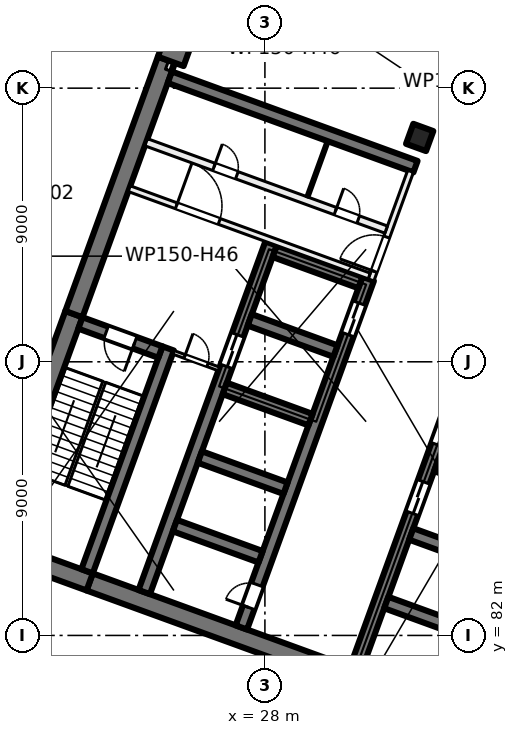
"""IFC4 building model, lengths in metres.
Left out: names, types, materials, properties, quantities, classifications, styles, units other than length and angle.
Written with IfcOpenShell. Run it as: python <this file> out.ifc"""

import sys

from ifc_helpers import new_model, si_unit, direction, frame, frame_2d, origin, origin_2d, place, context, subcontext, project, spatial, rectangle, extrude, element, fill, save


model = new_model("IFC4")
c1 = context("Model", 3, precision=1e-05, world=origin(), true_north=direction((0.0, 1.0)))
c2 = subcontext(c1, "Body", "Model", "MODEL_VIEW")
j1 = project(units=[si_unit("LENGTHUNIT", "METRE"), si_unit("PLANEANGLEUNIT", "RADIAN")], contexts=[c1])
p1 = place(None, origin())
s1 = spatial("IfcSite", under=j1, at=p1, CompositionType="ELEMENT")
p2 = place(p1, origin())
s2 = spatial("IfcBuilding", under=s1, at=p2, CompositionType="ELEMENT")
p3 = place(p2, frame((0.0, 0.0, 17.5)))
s3 = spatial("IfcBuildingStorey", under=s2, at=p3, CompositionType="ELEMENT", Elevation=17.5)
p4 = place(p3, frame((33.091, 98.379, 0.0), z_axis=(0.0, 0.0, 1.0), x_axis=(-0.342020143326, -0.939692620786, 0.0)))
e1 = element("IfcColumn", 1, at=p4, inside=s3, PredefinedType="COLUMN", context=c2, shape_type="SweptSolid", body=[
    extrude(rectangle(XDim=0.7, YDim=0.7, at=origin_2d()), origin(), (0.0, 0.0, 1.0), 5.0),
])
p5 = place(p3, frame((25.056, 101.303, 0.0), z_axis=(0.0, 0.0, 1.0), x_axis=(-0.342020143326, -0.939692620786, 0.0)))
e2 = element("IfcColumn", 2, at=p5, inside=s3, PredefinedType="COLUMN", context=c2, shape_type="SweptSolid", body=[
    extrude(rectangle(XDim=0.9, YDim=0.9, at=origin_2d()), origin(), (0.0, 0.0, 1.0), 5.0),
])
p6 = place(p3, frame((35.767, 78.835, 0.0), z_axis=(0.0, 0.0, 1.0), x_axis=(-0.939692894512, 0.342019391267, 0.0)))
e3 = element("IfcWall", 3, at=p6, inside=s3, PredefinedType="SHEAR", context=c2, shape_type="SweptSolid", body=[
    extrude(rectangle(XDim=14.4, YDim=0.6, at=frame_2d((7.2, 0.0))), origin(), (0.0, 0.0, 1.0), 5.0),
])
p7 = place(p3, frame((22.236, 83.76, 0.0), z_axis=(0.0, 0.0, 1.0), x_axis=(-0.939680822529, 0.342052557032, 0.0)))
e4 = element("IfcWall", 4, at=p7, inside=s3, PredefinedType="SHEAR", context=c2, shape_type="SweptSolid", body=[
    extrude(rectangle(XDim=3.8, YDim=0.6, at=frame_2d((1.9, 0.0))), origin(), (0.0, 0.0, 1.0), 5.0),
])
p8 = place(p3, frame((19.05, 85.239, 0.0), z_axis=(0.0, 0.0, 1.0), x_axis=(0.342016982193, 0.939693771338, 0.0)))
e5 = element("IfcWall", 5, at=p8, inside=s3, PredefinedType="SHEAR", context=c2, shape_type="SweptSolid", body=[
    extrude(rectangle(XDim=7.8, YDim=0.6, at=frame_2d((3.9, 0.0))), origin(), (0.0, 0.0, 1.0), 5.0),
])
p9 = place(p3, frame((21.717, 92.568, 0.0), z_axis=(0.0, 0.0, 1.0), x_axis=(0.342016162452, 0.939694069696, 0.0)))
e6 = element("IfcWall", 6, at=p9, inside=s3, PredefinedType="SHEAR", context=c2, shape_type="SweptSolid", body=[
    extrude(rectangle(XDim=8.9, YDim=0.6, at=frame_2d((4.45, 0.0))), origin(), (0.0, 0.0, 1.0), 5.0),
])
p10 = place(p3, frame((22.15, 84.11, 0.0), z_axis=(0.0, 0.0, 1.0), x_axis=(0.342016982193, 0.939693771338, 0.0)))
e7 = element("IfcWall", 7, at=p10, inside=s3, PredefinedType="SHEAR", context=c2, shape_type="SweptSolid", body=[
    extrude(rectangle(XDim=7.8, YDim=0.4, at=frame_2d((3.9, 0.0))), origin(), (0.0, 0.0, 1.0), 5.0),
])
p11 = place(p3, frame((24.562, 91.32, 0.0), z_axis=(0.0, 0.0, 1.0), x_axis=(-0.939717030584, 0.341953070509, 0.0)))
e8 = element("IfcWall", 8, at=p11, inside=s3, PredefinedType="SHEAR", context=c2, shape_type="SweptSolid", body=[
    extrude(rectangle(XDim=2.8, YDim=0.4, at=frame_2d((1.4, 0.0))), origin(), (0.0, 0.0, 1.0), 5.0),
])
p12 = place(p11, frame((0.9, 0.0, 0.0)))
e9 = element("IfcOpeningElement", 9, at=p12, cuts=e8, PredefinedType="OPENING", context=c2, shape_type="SweptSolid", body=[
    extrude(rectangle(XDim=1.0, YDim=2.1, at=frame_2d((0.5, 1.05))), frame((0.0, 0.21, 0.0), z_axis=(0.0, -1.0, 0.0), x_axis=(1.0, 0.0, 0.0)), (0.0, 0.0, 1.0), 0.42),
])
p13 = place(p3, frame((30.984, 80.895, 0.0), z_axis=(0.0, 0.0, 1.0), x_axis=(0.342021021735, 0.939692301071, 0.0)))
e10 = element("IfcWall", 10, at=p13, inside=s3, PredefinedType="SHEAR", context=c2, shape_type="SweptSolid", body=[
    extrude(rectangle(XDim=12.2, YDim=0.4, at=frame_2d((6.1, 0.0))), origin(), (0.0, 0.0, 1.0), 5.0),
])
p14 = place(p13, frame((5.45, 0.0, 0.0)))
e11 = element("IfcOpeningElement", 11, at=p14, cuts=e10, PredefinedType="OPENING", context=c2, shape_type="SweptSolid", body=[
    extrude(rectangle(XDim=1.1, YDim=2.1, at=frame_2d((0.55, 1.05))), frame((0.0, 0.21, 0.0), z_axis=(0.0, -1.0, 0.0), x_axis=(1.0, 0.0, 0.0)), (0.0, 0.0, 1.0), 0.42),
])
p15 = place(p13, frame((7.85, 0.0, 0.0)))
e12 = element("IfcOpeningElement", 12, at=p15, cuts=e10, PredefinedType="OPENING", context=c2, shape_type="SweptSolid", body=[
    extrude(rectangle(XDim=1.1, YDim=2.1, at=frame_2d((0.55, 1.05))), frame((0.0, 0.21, 0.0), z_axis=(0.0, -1.0, 0.0), x_axis=(1.0, 0.0, 0.0)), (0.0, 0.0, 1.0), 0.42),
])
p16 = place(p13, frame((10.25, 0.0, 0.0)))
e13 = element("IfcOpeningElement", 13, at=p16, cuts=e10, PredefinedType="OPENING", context=c2, shape_type="SweptSolid", body=[
    extrude(rectangle(XDim=1.1, YDim=2.1, at=frame_2d((0.55, 1.05))), frame((0.0, 0.21, 0.0), z_axis=(0.0, -1.0, 0.0), x_axis=(1.0, 0.0, 0.0)), (0.0, 0.0, 1.0), 0.42),
])
for number, where, z_axis, x_axis in (
    (14, (34.812, 82.056, 0.0), (0.0, 0.0, 1.0), (-0.94, 0.342, 0.0)),
    (15, (35.632, 84.311, 0.0), (0.0, 0.0, 1.0), (-0.94, 0.342, 0.0)),
    (16, (36.453, 86.566, 0.0), (0.0, 0.0, 1.0), (-0.94, 0.342, 0.0)),
):
    element("IfcWall", number, at=place(p3, frame(where, z_axis=z_axis, x_axis=x_axis)), inside=s3, PredefinedType="SHEAR", context=c2, shape_type="SweptSolid", body=[
        extrude(rectangle(XDim=3.0, YDim=0.4, at=frame_2d((1.5, 0.0))), origin(), (0.0, 0.0, 1.0), 5.0),
    ])
p17 = place(p3, frame((27.225, 82.263, 0.0), z_axis=(0.0, 0.0, 1.0), x_axis=(0.342014590177, 0.939694641948, 0.0)))
e17 = element("IfcWall", 17, at=p17, inside=s3, PredefinedType="SHEAR", context=c2, shape_type="SweptSolid", body=[
    extrude(rectangle(XDim=12.2, YDim=0.4, at=frame_2d((6.1, 0.0))), origin(), (0.0, 0.0, 1.0), 5.0),
])
p18 = place(p17, frame((10.25, 0.0, 0.0)))
e18 = element("IfcOpeningElement", 18, at=p18, cuts=e17, PredefinedType="OPENING", context=c2, shape_type="SweptSolid", body=[
    extrude(rectangle(XDim=1.1, YDim=2.1, at=frame_2d((0.55, 1.05))), frame((0.0, 0.21, 0.0), z_axis=(0.0, -1.0, 0.0), x_axis=(1.0, 0.0, 0.0)), (0.0, 0.0, 1.0), 0.42),
])
p19 = place(p17, frame((0.7, 0.0, 0.0)))
e19 = element("IfcOpeningElement", 19, at=p19, cuts=e17, PredefinedType="OPENING", context=c2, shape_type="SweptSolid", body=[
    extrude(rectangle(XDim=0.8, YDim=2.1, at=frame_2d((0.4, 1.05))), frame((0.0, 0.21, 0.0), z_axis=(0.0, -1.0, 0.0), x_axis=(1.0, 0.0, 0.0)), (0.0, 0.0, 1.0), 0.42),
])
p20 = place(p3, frame((24.03, 83.426, 0.0), z_axis=(0.0, 0.0, 1.0), x_axis=(0.342014590177, 0.939694641948, 0.0)))
e20 = element("IfcWall", 20, at=p20, inside=s3, PredefinedType="SHEAR", context=c2, shape_type="SweptSolid", body=[
    extrude(rectangle(XDim=12.2, YDim=0.4, at=frame_2d((6.1, 0.0))), origin(), (0.0, 0.0, 1.0), 5.0),
])
p21 = place(p20, frame((7.9, 0.0, 0.0)))
e21 = element("IfcOpeningElement", 21, at=p21, cuts=e20, PredefinedType="OPENING", context=c2, shape_type="SweptSolid", body=[
    extrude(rectangle(XDim=1.1, YDim=2.1, at=frame_2d((0.55, 1.05))), frame((0.0, 0.21, 0.0), z_axis=(0.0, -1.0, 0.0), x_axis=(1.0, 0.0, 0.0)), (0.0, 0.0, 1.0), 0.42),
])
p22 = place(p3, frame((27.858, 84.587, 0.0), z_axis=(0.0, 0.0, 1.0), x_axis=(-0.939686455819, 0.342037080957, 0.0)))
e22 = element("IfcWall", 22, at=p22, inside=s3, PredefinedType="SHEAR", context=c2, shape_type="SweptSolid", body=[
    extrude(rectangle(XDim=3.0, YDim=0.4, at=frame_2d((1.5, 0.0))), origin(), (0.0, 0.0, 1.0), 5.0),
])
p23 = place(p3, frame((28.678, 86.842, 0.0), z_axis=(0.0, 0.0, 1.0), x_axis=(-0.939676934218, 0.342063238742, 0.0)))
e23 = element("IfcWall", 23, at=p23, inside=s3, PredefinedType="SHEAR", context=c2, shape_type="SweptSolid", body=[
    extrude(rectangle(XDim=3.0, YDim=0.4, at=frame_2d((1.5, 0.0))), origin(), (0.0, 0.0, 1.0), 5.0),
])
for number, where, z_axis, x_axis in (
    (24, (29.5, 89.097, 0.0), (0.0, 0.0, 1.0), (-0.94, 0.342, 0.0)),
    (25, (30.32, 91.353, 0.0), (0.0, 0.0, 1.0), (-0.94, 0.342, 0.0)),
    (26, (31.141, 93.608, 0.0), (0.0, 0.0, 1.0), (-0.94, 0.342, 0.0)),
):
    element("IfcWall", number, at=place(p3, frame(where, z_axis=z_axis, x_axis=x_axis)), inside=s3, PredefinedType="SHEAR", context=c2, shape_type="SweptSolid", body=[
        extrude(rectangle(XDim=3.0, YDim=0.4, at=frame_2d((1.5, 0.0))), origin(), (0.0, 0.0, 1.0), 5.0),
    ])
p24 = place(p3, frame((32.953, 97.418, 0.0), z_axis=(0.0, 0.0, 1.0), x_axis=(-0.93969060187, 0.342025690201, 0.0)))
e27 = element("IfcWall", 27, at=p24, inside=s3, PredefinedType="SHEAR", context=c2, shape_type="SweptSolid", body=[
    extrude(rectangle(XDim=8.6, YDim=0.4, at=frame_2d((4.3, 0.0))), origin(), (0.0, 0.0, 1.0), 5.0),
])
p25 = place(p3, frame((12.199, 89.809, 0.0), z_axis=(0.0, 0.0, 1.0), x_axis=(0.342022998908, 0.939691581434, 0.0)))
e28 = element("IfcWall", 28, at=p25, inside=s3, PredefinedType="SOLIDWALL", context=c2, shape_type="SweptSolid", body=[
    extrude(rectangle(XDim=47.334, YDim=0.6, at=frame_2d((23.667, 0.0))), origin(), (0.0, 0.0, 1.0), 4.6),
])
p26 = place(p25, frame((0.773, 0.0, 0.9)))
e29 = element("IfcOpeningElement", 29, at=p26, cuts=e28, PredefinedType="OPENING", context=c2, shape_type="SweptSolid", body=[
    extrude(rectangle(XDim=3.0, YDim=3.0, at=frame_2d((1.5, 1.5))), frame((0.0, 0.31, 0.0), z_axis=(0.0, -1.0, 0.0), x_axis=(1.0, 0.0, 0.0)), (0.0, 0.0, 1.0), 0.62),
])
p27 = place(p25, frame((5.379, 0.0, 0.9)))
e30 = element("IfcOpeningElement", 30, at=p27, cuts=e28, PredefinedType="OPENING", context=c2, shape_type="SweptSolid", body=[
    extrude(rectangle(XDim=3.0, YDim=3.0, at=frame_2d((1.5, 1.5))), frame((0.0, 0.31, 0.0), z_axis=(0.0, -1.0, 0.0), x_axis=(1.0, 0.0, 0.0)), (0.0, 0.0, 1.0), 0.62),
])
p28 = place(p25, frame((9.235, 0.0, 0.9)))
e31 = element("IfcOpeningElement", 31, at=p28, cuts=e28, PredefinedType="OPENING", context=c2, shape_type="SweptSolid", body=[
    extrude(rectangle(XDim=3.0, YDim=3.0, at=frame_2d((1.5, 1.5))), frame((0.0, 0.31, 0.0), z_axis=(0.0, -1.0, 0.0), x_axis=(1.0, 0.0, 0.0)), (0.0, 0.0, 1.0), 0.62),
])
p29 = place(p25, frame((13.99, 0.0, 0.9)))
e32 = element("IfcOpeningElement", 32, at=p29, cuts=e28, PredefinedType="OPENING", context=c2, shape_type="SweptSolid", body=[
    extrude(rectangle(XDim=3.0, YDim=3.0, at=frame_2d((1.5, 1.5))), frame((0.0, 0.31, 0.0), z_axis=(0.0, -1.0, 0.0), x_axis=(1.0, 0.0, 0.0)), (0.0, 0.0, 1.0), 0.62),
])
p30 = place(p25, frame((18.118, 0.0, 0.9)))
e33 = element("IfcOpeningElement", 33, at=p30, cuts=e28, PredefinedType="OPENING", context=c2, shape_type="SweptSolid", body=[
    extrude(rectangle(XDim=1.2, YDim=3.0, at=frame_2d((0.6, 1.5))), frame((0.0, 0.31, 0.0), z_axis=(0.0, -1.0, 0.0), x_axis=(1.0, 0.0, 0.0)), (0.0, 0.0, 1.0), 0.62),
])
p31 = place(p25, frame((19.618, 0.0, 0.9)))
e34 = element("IfcOpeningElement", 34, at=p31, cuts=e28, PredefinedType="OPENING", context=c2, shape_type="SweptSolid", body=[
    extrude(rectangle(XDim=1.2, YDim=3.0, at=frame_2d((0.6, 1.5))), frame((0.0, 0.31, 0.0), z_axis=(0.0, -1.0, 0.0), x_axis=(1.0, 0.0, 0.0)), (0.0, 0.0, 1.0), 0.62),
])
p32 = place(p25, frame((22.452, 0.0, 0.9)))
e35 = element("IfcOpeningElement", 35, at=p32, cuts=e28, PredefinedType="OPENING", context=c2, shape_type="SweptSolid", body=[
    extrude(rectangle(XDim=3.0, YDim=3.0, at=frame_2d((1.5, 1.5))), frame((0.0, 0.31, 0.0), z_axis=(0.0, -1.0, 0.0), x_axis=(1.0, 0.0, 0.0)), (0.0, 0.0, 1.0), 0.62),
])
p33 = place(p25, frame((26.458, 0.0, 0.9)))
e36 = element("IfcOpeningElement", 36, at=p33, cuts=e28, PredefinedType="OPENING", context=c2, shape_type="SweptSolid", body=[
    extrude(rectangle(XDim=3.0, YDim=3.0, at=frame_2d((1.5, 1.5))), frame((0.0, 0.31, 0.0), z_axis=(0.0, -1.0, 0.0), x_axis=(1.0, 0.0, 0.0)), (0.0, 0.0, 1.0), 0.62),
])
p34 = place(p25, frame((32.484, 0.0, 0.9)))
e37 = element("IfcOpeningElement", 37, at=p34, cuts=e28, PredefinedType="OPENING", context=c2, shape_type="SweptSolid", body=[
    extrude(rectangle(XDim=1.2, YDim=3.0, at=frame_2d((0.6, 1.5))), frame((0.0, 0.31, 0.0), z_axis=(0.0, -1.0, 0.0), x_axis=(1.0, 0.0, 0.0)), (0.0, 0.0, 1.0), 0.62),
])
p35 = place(p25, frame((35.07, 0.0, 0.9)))
e38 = element("IfcOpeningElement", 38, at=p35, cuts=e28, PredefinedType="OPENING", context=c2, shape_type="SweptSolid", body=[
    extrude(rectangle(XDim=3.0, YDim=3.0, at=frame_2d((1.5, 1.5))), frame((0.0, 0.31, 0.0), z_axis=(0.0, -1.0, 0.0), x_axis=(1.0, 0.0, 0.0)), (0.0, 0.0, 1.0), 0.62),
])
p36 = place(p25, frame((39.676, 0.0, 0.9)))
e39 = element("IfcOpeningElement", 39, at=p36, cuts=e28, PredefinedType="OPENING", context=c2, shape_type="SweptSolid", body=[
    extrude(rectangle(XDim=3.0, YDim=3.0, at=frame_2d((1.5, 1.5))), frame((0.0, 0.31, 0.0), z_axis=(0.0, -1.0, 0.0), x_axis=(1.0, 0.0, 0.0)), (0.0, 0.0, 1.0), 0.62),
])
p37 = place(p25, frame((43.531, 0.0, 0.9)))
e40 = element("IfcOpeningElement", 40, at=p37, cuts=e28, PredefinedType="OPENING", context=c2, shape_type="SweptSolid", body=[
    extrude(rectangle(XDim=3.0, YDim=3.0, at=frame_2d((1.5, 1.5))), frame((0.0, 0.31, 0.0), z_axis=(0.0, -1.0, 0.0), x_axis=(1.0, 0.0, 0.0)), (0.0, 0.0, 1.0), 0.62),
])
p38 = place(p3, frame((31.491, 93.693, 0.0), z_axis=(0.0, 0.0, 1.0), x_axis=(0.341995824804, 0.939701471648, 0.0)))
e41 = element("IfcWall", 41, at=p38, inside=s3, PredefinedType="PARTITIONING", context=c2, shape_type="SweptSolid", body=[
    extrude(rectangle(XDim=3.8, YDim=0.2, at=frame_2d((1.9, 0.0))), origin(), (0.0, 0.0, 1.0), 4.6),
])
p39 = place(p38, frame((0.3, 0.0, 0.0)))
e42 = element("IfcOpeningElement", 42, at=p39, cuts=e41, PredefinedType="OPENING", context=c2, shape_type="SweptSolid", body=[
    extrude(rectangle(XDim=1.2, YDim=2.1, at=frame_2d((0.6, 1.05))), frame((0.0, 0.11, 0.0), z_axis=(0.0, -1.0, 0.0), x_axis=(1.0, 0.0, 0.0)), (0.0, 0.0, 1.0), 0.22),
])
p40 = place(p3, frame((23.538, 96.694, 0.0), z_axis=(0.0, 0.0, 1.0), x_axis=(0.939691552312, -0.342023078919, 0.0)))
e43 = element("IfcWall", 43, at=p40, inside=s3, PredefinedType="PARTITIONING", context=c2, shape_type="SweptSolid", body=[
    extrude(rectangle(XDim=8.4, YDim=0.2, at=frame_2d((4.2, 0.0))), origin(), (0.0, 0.0, 1.0), 4.6),
])
p41 = place(p40, frame((1.65, 0.0, 0.0)))
e44 = element("IfcOpeningElement", 44, at=p41, cuts=e43, PredefinedType="OPENING", context=c2, shape_type="SweptSolid", body=[
    extrude(rectangle(XDim=1.5, YDim=2.1, at=frame_2d((0.75, 1.05))), frame((0.0, 0.11, 0.0), z_axis=(0.0, -1.0, 0.0), x_axis=(1.0, 0.0, 0.0)), (0.0, 0.0, 1.0), 0.22),
])
p42 = place(p3, frame((24.094, 98.221, 0.0), z_axis=(0.0, 0.0, 1.0), x_axis=(0.939691552312, -0.342023078919, 0.0)))
e45 = element("IfcWall", 45, at=p42, inside=s3, PredefinedType="PARTITIONING", context=c2, shape_type="SweptSolid", body=[
    extrude(rectangle(XDim=8.4, YDim=0.25, at=frame_2d((4.2, 0.0))), origin(), (0.0, 0.0, 1.0), 4.6),
])
p43 = place(p42, frame((6.625, 0.0, 0.0)))
e46 = element("IfcOpeningElement", 46, at=p43, cuts=e45, PredefinedType="OPENING", context=c2, shape_type="SweptSolid", body=[
    extrude(rectangle(XDim=0.8, YDim=2.1, at=frame_2d((0.4, 1.05))), frame((0.0, 0.135, 0.0), z_axis=(0.0, -1.0, 0.0), x_axis=(1.0, 0.0, 0.0)), (0.0, 0.0, 1.0), 0.27),
])
p44 = place(p42, frame((2.375, 0.0, 0.0)))
e47 = element("IfcOpeningElement", 47, at=p44, cuts=e45, PredefinedType="OPENING", context=c2, shape_type="SweptSolid", body=[
    extrude(rectangle(XDim=0.8, YDim=2.1, at=frame_2d((0.4, 1.05))), frame((0.0, 0.135, 0.0), z_axis=(0.0, -1.0, 0.0), x_axis=(1.0, 0.0, 0.0)), (0.0, 0.0, 1.0), 0.27),
])
p45 = place(p3, frame((24.985, 91.312, 0.0), z_axis=(0.0, 0.0, 1.0), x_axis=(0.939708740826, -0.341975850632, 0.0)))
e48 = element("IfcWall", 48, at=p45, inside=s3, PredefinedType="PARTITIONING", context=c2, shape_type="SweptSolid", body=[
    extrude(rectangle(XDim=1.6, YDim=0.125, at=frame_2d((0.8, 0.0))), origin(), (0.0, 0.0, 1.0), 4.6),
])
p46 = place(p45, frame((0.4, 0.0, 0.0)))
e49 = element("IfcOpeningElement", 49, at=p46, cuts=e48, PredefinedType="OPENING", context=c2, shape_type="SweptSolid", body=[
    extrude(rectangle(XDim=0.8, YDim=2.1, at=frame_2d((0.4, 1.05))), frame((0.0, 0.073, 0.0), z_axis=(0.0, -1.0, 0.0), x_axis=(1.0, 0.0, 0.0)), (0.0, 0.0, 1.0), 0.145),
])
p47 = place(p3, frame((29.399, 96.424, 0.0), z_axis=(0.0, 0.0, 1.0), x_axis=(0.341913947243, 0.939731266204, 0.0)))
e50 = element("IfcWall", 50, at=p47, inside=s3, PredefinedType="PARTITIONING", context=c2, shape_type="SweptSolid", body=[
    extrude(rectangle(XDim=1.95, YDim=0.1, at=frame_2d((0.975, 0.0))), origin(), (0.0, 0.0, 1.0), 4.6),
])
p48 = place(p3, frame((24.8, 100.598, 0.0), z_axis=(0.0, 0.0, 1.0), x_axis=(0.34194689438, 0.939719277989, 0.0)))
e51 = element("IfcWall", 51, at=p48, inside=s3, PredefinedType="PARTITIONING", context=c2, shape_type="SweptSolid", body=[
    extrude(rectangle(XDim=5.001, YDim=0.15, at=frame_2d((2.5, 0.0))), origin(), (0.0, 0.0, 1.0), 4.6),
])
p49 = place(p48, frame((1.6, 0.0, 0.0)))
e52 = element("IfcOpeningElement", 52, at=p49, cuts=e51, PredefinedType="OPENING", context=c2, shape_type="SweptSolid", body=[
    extrude(rectangle(XDim=1.8, YDim=2.1, at=frame_2d((0.9, 1.05))), frame((0.0, 0.085, 0.0), z_axis=(0.0, -1.0, 0.0), x_axis=(1.0, 0.0, 0.0)), (0.0, 0.0, 1.0), 0.17),
])
p50 = place(p18, origin())
e53 = element("IfcDoor", 53, at=p50, inside=s3, OperationType="DOUBLE_DOOR_SLIDING", PredefinedType="DOOR", context=c2, shape_type="SweptSolid", body=[
    extrude(rectangle(XDim=1.1, YDim=2.1, at=frame_2d((0.55, 1.05))), frame((0.0, 0.025, 0.0), z_axis=(0.0, -1.0, 0.0), x_axis=(1.0, 0.0, 0.0)), (0.0, 0.0, 1.0), 0.05),
])
fill(e18, e53)
p51 = place(p14, origin())
e54 = element("IfcDoor", 54, at=p51, inside=s3, OperationType="DOUBLE_DOOR_SLIDING", PredefinedType="DOOR", context=c2, shape_type="SweptSolid", body=[
    extrude(rectangle(XDim=1.1, YDim=2.1, at=frame_2d((0.55, 1.05))), frame((0.0, 0.025, 0.0), z_axis=(0.0, -1.0, 0.0), x_axis=(1.0, 0.0, 0.0)), (0.0, 0.0, 1.0), 0.05),
])
fill(e11, e54)
p52 = place(p15, origin())
e55 = element("IfcDoor", 55, at=p52, inside=s3, OperationType="DOUBLE_DOOR_SLIDING", PredefinedType="DOOR", context=c2, shape_type="SweptSolid", body=[
    extrude(rectangle(XDim=1.1, YDim=2.1, at=frame_2d((0.55, 1.05))), frame((0.0, 0.025, 0.0), z_axis=(0.0, -1.0, 0.0), x_axis=(1.0, 0.0, 0.0)), (0.0, 0.0, 1.0), 0.05),
])
fill(e12, e55)
p53 = place(p19, origin())
e56 = element("IfcDoor", 56, at=p53, inside=s3, OperationType="SINGLE_SWING_LEFT", PredefinedType="DOOR", context=c2, shape_type="SweptSolid", body=[
    extrude(rectangle(XDim=0.8, YDim=2.1, at=frame_2d((0.4, 1.05))), frame((0.0, 0.025, 0.0), z_axis=(0.0, -1.0, 0.0), x_axis=(1.0, 0.0, 0.0)), (0.0, 0.0, 1.0), 0.05),
])
fill(e19, e56)
p54 = place(p39, origin())
e57 = element("IfcDoor", 57, at=p54, inside=s3, OperationType="DOUBLE_DOOR_SINGLE_SWING", PredefinedType="DOOR", context=c2, shape_type="SweptSolid", body=[
    extrude(rectangle(XDim=1.2, YDim=2.1, at=frame_2d((0.6, 1.05))), frame((0.0, 0.025, 0.0), z_axis=(0.0, -1.0, 0.0), x_axis=(1.0, 0.0, 0.0)), (0.0, 0.0, 1.0), 0.05),
])
fill(e42, e57)
p55 = place(p41, origin())
e58 = element("IfcDoor", 58, at=p55, inside=s3, OperationType="DOUBLE_DOOR_SINGLE_SWING", PredefinedType="DOOR", context=c2, shape_type="SweptSolid", body=[
    extrude(rectangle(XDim=1.5, YDim=2.1, at=frame_2d((0.75, 1.05))), frame((0.0, 0.025, 0.0), z_axis=(0.0, -1.0, 0.0), x_axis=(1.0, 0.0, 0.0)), (0.0, 0.0, 1.0), 0.05),
])
fill(e44, e58)
p56 = place(p12, origin())
e59 = element("IfcDoor", 59, at=p56, inside=s3, OperationType="SINGLE_SWING_LEFT", PredefinedType="DOOR", context=c2, shape_type="SweptSolid", body=[
    extrude(rectangle(XDim=1.0, YDim=2.1, at=frame_2d((0.5, 1.05))), frame((0.0, 0.025, 0.0), z_axis=(0.0, -1.0, 0.0), x_axis=(1.0, 0.0, 0.0)), (0.0, 0.0, 1.0), 0.05),
])
fill(e9, e59)
p57 = place(p46, origin())
e60 = element("IfcDoor", 60, at=p57, inside=s3, OperationType="SINGLE_SWING_RIGHT", PredefinedType="DOOR", context=c2, shape_type="SweptSolid", body=[
    extrude(rectangle(XDim=0.8, YDim=2.1, at=frame_2d((0.4, 1.05))), frame((0.0, 0.025, 0.0), z_axis=(0.0, -1.0, 0.0), x_axis=(1.0, 0.0, 0.0)), (0.0, 0.0, 1.0), 0.05),
])
fill(e49, e60)
p58 = place(p43, origin())
e61 = element("IfcDoor", 61, at=p58, inside=s3, OperationType="SINGLE_SWING_LEFT", PredefinedType="DOOR", context=c2, shape_type="SweptSolid", body=[
    extrude(rectangle(XDim=0.8, YDim=2.1, at=frame_2d((0.4, 1.05))), frame((0.0, 0.025, 0.0), z_axis=(0.0, -1.0, 0.0), x_axis=(1.0, 0.0, 0.0)), (0.0, 0.0, 1.0), 0.05),
])
fill(e46, e61)
p59 = place(p44, origin())
e62 = element("IfcDoor", 62, at=p59, inside=s3, OperationType="SINGLE_SWING_RIGHT", PredefinedType="DOOR", context=c2, shape_type="SweptSolid", body=[
    extrude(rectangle(XDim=0.8, YDim=2.1, at=frame_2d((0.4, 1.05))), frame((0.0, 0.025, 0.0), z_axis=(0.0, -1.0, 0.0), x_axis=(1.0, 0.0, 0.0)), (0.0, 0.0, 1.0), 0.05),
])
fill(e47, e62)
p60 = place(p21, origin())
e63 = element("IfcDoor", 63, at=p60, inside=s3, OperationType="DOUBLE_DOOR_SLIDING", PredefinedType="DOOR", context=c2, shape_type="SweptSolid", body=[
    extrude(rectangle(XDim=1.1, YDim=2.1, at=frame_2d((0.55, 1.05))), frame((0.0, 0.025, 0.0), z_axis=(0.0, -1.0, 0.0), x_axis=(1.0, 0.0, 0.0)), (0.0, 0.0, 1.0), 0.05),
])
fill(e21, e63)
save(model, sys.argv[1])
